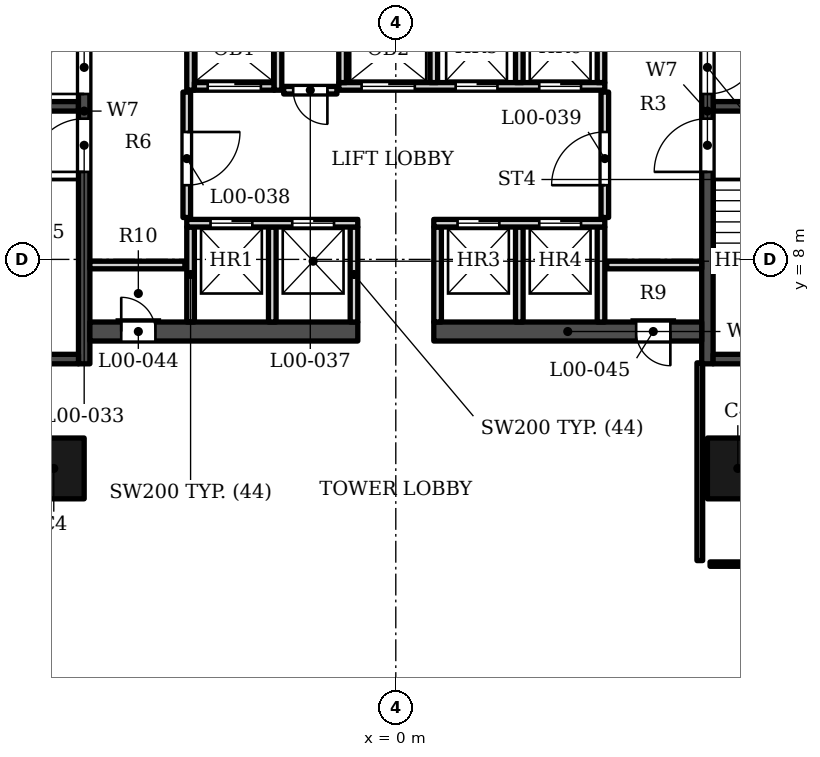
"""IFC4 building model, lengths in metres.
Left out: names, types, materials, properties, quantities, classifications, styles, units other than length and angle.
Written with IfcOpenShell. Run it as: python <this file> out.ifc"""

import sys

from ifc_helpers import new_model, si_unit, direction, frame, frame_2d, origin, origin_2d, place, context, subcontext, project, spatial, rectangle, extrude, element, fill, save


model = new_model("IFC4")
c1 = context("Model", 3, precision=1e-05, world=origin(), true_north=direction((0.0, 1.0)))
c2 = subcontext(c1, "Body", "Model", "MODEL_VIEW")
j1 = project(units=[si_unit("LENGTHUNIT", "METRE"), si_unit("PLANEANGLEUNIT", "RADIAN")], contexts=[c1])
p1 = place(None, origin())
s1 = spatial("IfcSite", under=j1, at=p1, CompositionType="ELEMENT")
p2 = place(p1, origin())
s2 = spatial("IfcBuilding", under=s1, at=p2, CompositionType="ELEMENT")
p3 = place(p2, origin())
s3 = spatial("IfcBuildingStorey", under=s2, at=p3, CompositionType="ELEMENT", Elevation=0.0)
for number, where, z_axis, x_axis in (
    (1, (-9.0, 2.5, 0.0), (0.0, 0.0, 1.0), (1.0, 0.0, 0.0)),
    (2, (9.0, 2.5, 0.0), (0.0, 0.0, 1.0), (1.0, 0.0, 0.0)),
):
    element("IfcColumn", number, at=place(p3, frame(where, z_axis=z_axis, x_axis=x_axis)), inside=s3, PredefinedType="COLUMN", context=c2, shape_type="SweptSolid", body=[
        extrude(rectangle(XDim=1.6, YDim=1.6, at=origin_2d()), origin(), (0.0, 0.0, 1.0), 9.0),
    ])
p4 = place(p3, frame((-8.2, 5.253, 0.0), z_axis=(0.0, 0.0, 1.0), x_axis=(0.0, 1.0, 0.0)))
e3 = element("IfcWall", 3, at=p4, inside=s3, PredefinedType="SHEAR", context=c2, shape_type="SweptSolid", body=[
    extrude(rectangle(XDim=13.3, YDim=0.3, at=frame_2d((6.65, 0.0))), origin(), (0.0, 0.0, 1.0), 9.0),
])
p5 = place(p4, frame((7.1, 0.0, 0.0)))
e4 = element("IfcOpeningElement", 4, at=p5, cuts=e3, PredefinedType="OPENING", context=c2, shape_type="SweptSolid", body=[
    extrude(rectangle(XDim=1.4, YDim=2.1, at=frame_2d((0.7, 1.05))), frame((0.0, 0.16, 0.0), z_axis=(0.0, -1.0, 0.0), x_axis=(1.0, 0.0, 0.0)), (0.0, 0.0, 1.0), 0.32),
])
p6 = place(p4, frame((5.05, 0.0, 0.0)))
e5 = element("IfcOpeningElement", 5, at=p6, cuts=e3, PredefinedType="OPENING", context=c2, shape_type="SweptSolid", body=[
    extrude(rectangle(XDim=1.4, YDim=2.1, at=frame_2d((0.7, 1.05))), frame((0.0, 0.16, 0.0), z_axis=(0.0, -1.0, 0.0), x_axis=(1.0, 0.0, 0.0)), (0.0, 0.0, 1.0), 0.32),
])
for number, where, z_axis, x_axis in (
    (6, (-12.1, 12.028, 0.0), (0.0, 0.0, 1.0), (1.0, 0.0, 0.0)),
    (7, (-12.1, 5.378, 0.0), (0.0, 0.0, 1.0), (1.0, 0.0, 0.0)),
):
    element("IfcWall", number, at=place(p3, frame(where, z_axis=z_axis, x_axis=x_axis)), inside=s3, PredefinedType="SHEAR", context=c2, shape_type="SweptSolid", body=[
        extrude(rectangle(XDim=3.75, YDim=0.25, at=frame_2d((1.875, 0.0))), origin(), (0.0, 0.0, 1.0), 9.0),
    ])
p7 = place(p3, frame((8.2, 5.253, 0.0), z_axis=(0.0, 0.0, 1.0), x_axis=(0.0, 1.0, 0.0)))
e8 = element("IfcWall", 8, at=p7, inside=s3, PredefinedType="SHEAR", context=c2, shape_type="SweptSolid", body=[
    extrude(rectangle(XDim=13.3, YDim=0.3, at=frame_2d((6.65, 0.0))), origin(), (0.0, 0.0, 1.0), 9.0),
])
p8 = place(p7, frame((7.1, 0.0, 0.0)))
e9 = element("IfcOpeningElement", 9, at=p8, cuts=e8, PredefinedType="OPENING", context=c2, shape_type="SweptSolid", body=[
    extrude(rectangle(XDim=1.4, YDim=2.1, at=frame_2d((0.7, 1.05))), frame((0.0, 0.16, 0.0), z_axis=(0.0, -1.0, 0.0), x_axis=(1.0, 0.0, 0.0)), (0.0, 0.0, 1.0), 0.32),
])
p9 = place(p7, frame((5.05, 0.0, 0.0)))
e10 = element("IfcOpeningElement", 10, at=p9, cuts=e8, PredefinedType="OPENING", context=c2, shape_type="SweptSolid", body=[
    extrude(rectangle(XDim=1.4, YDim=2.1, at=frame_2d((0.7, 1.05))), frame((0.0, 0.16, 0.0), z_axis=(0.0, -1.0, 0.0), x_axis=(1.0, 0.0, 0.0)), (0.0, 0.0, 1.0), 0.32),
])
for number, where, z_axis, x_axis in (
    (11, (8.35, 12.028, 0.0), (0.0, 0.0, 1.0), (1.0, 0.0, 0.0)),
    (12, (8.35, 5.378, 0.0), (0.0, 0.0, 1.0), (1.0, 0.0, 0.0)),
):
    element("IfcWall", number, at=place(p3, frame(where, z_axis=z_axis, x_axis=x_axis)), inside=s3, PredefinedType="SHEAR", context=c2, shape_type="SweptSolid", body=[
        extrude(rectangle(XDim=3.75, YDim=0.25, at=frame_2d((1.875, 0.0))), origin(), (0.0, 0.0, 1.0), 9.0),
    ])
p10 = place(p3, frame((-8.05, 6.103, 0.0), z_axis=(0.0, 0.0, 1.0), x_axis=(1.0, 0.0, 0.0)))
e13 = element("IfcWall", 13, at=p10, inside=s3, PredefinedType="SHEAR", context=c2, shape_type="SweptSolid", body=[
    extrude(rectangle(XDim=7.05, YDim=0.5, at=frame_2d((3.525, 0.0))), origin(), (0.0, 0.0, 1.0), 9.0),
])
p11 = place(p10, frame((0.825, 0.0, 0.0)))
e14 = element("IfcOpeningElement", 14, at=p11, cuts=e13, PredefinedType="OPENING", context=c2, shape_type="SweptSolid", body=[
    extrude(rectangle(XDim=0.9, YDim=2.1, at=frame_2d((0.45, 1.05))), frame((0.0, 0.26, 0.0), z_axis=(0.0, -1.0, 0.0), x_axis=(1.0, 0.0, 0.0)), (0.0, 0.0, 1.0), 0.52),
])
p12 = place(p3, frame((1.0, 6.103, 0.0), z_axis=(0.0, 0.0, 1.0), x_axis=(1.0, 0.0, 0.0)))
e15 = element("IfcWall", 15, at=p12, inside=s3, PredefinedType="SHEAR", context=c2, shape_type="SweptSolid", body=[
    extrude(rectangle(XDim=7.05, YDim=0.5, at=frame_2d((3.525, 0.0))), origin(), (0.0, 0.0, 1.0), 9.0),
])
p13 = place(p12, frame((5.325, 0.0, 0.0)))
e16 = element("IfcOpeningElement", 16, at=p13, cuts=e15, PredefinedType="OPENING", context=c2, shape_type="SweptSolid", body=[
    extrude(rectangle(XDim=0.9, YDim=2.1, at=frame_2d((0.45, 1.05))), frame((0.0, 0.26, 0.0), z_axis=(0.0, -1.0, 0.0), x_axis=(1.0, 0.0, 0.0)), (0.0, 0.0, 1.0), 0.52),
])
for number, where, z_axis, x_axis in (
    (17, (-5.4, 6.353, 0.0), (0.0, 0.0, 1.0), (0.0, 1.0, 0.0)),
    (18, (-3.25, 6.353, 0.0), (0.0, 0.0, 1.0), (0.0, 1.0, 0.0)),
    (19, (-1.1, 6.353, 0.0), (0.0, 0.0, 1.0), (0.0, 1.0, 0.0)),
    (20, (1.1, 6.353, 0.0), (0.0, 0.0, 1.0), (0.0, 1.0, 0.0)),
    (21, (3.25, 6.353, 0.0), (0.0, 0.0, 1.0), (0.0, 1.0, 0.0)),
    (22, (5.4, 6.353, 0.0), (0.0, 0.0, 1.0), (0.0, 1.0, 0.0)),
    (23, (-8.05, 7.853, 0.0), (0.0, 0.0, 1.0), (1.0, 0.0, 0.0)),
    (24, (5.55, 7.853, 0.0), (0.0, 0.0, 1.0), (1.0, 0.0, 0.0)),
):
    element("IfcWall", number, at=place(p3, frame(where, z_axis=z_axis, x_axis=x_axis)), inside=s3, PredefinedType="SOLIDWALL", context=c2, shape_type="SweptSolid", body=[
        extrude(rectangle(XDim=2.5, YDim=0.2, at=frame_2d((1.25, 0.0))), origin(), (0.0, 0.0, 1.0), 8.5),
    ])
p14 = place(p3, frame((-5.5, 8.953, 0.0), z_axis=(0.0, 0.0, 1.0), x_axis=(1.0, 0.0, 0.0)))
e25 = element("IfcWall", 25, at=p14, inside=s3, PredefinedType="SOLIDWALL", context=c2, shape_type="SweptSolid", body=[
    extrude(rectangle(XDim=4.5, YDim=0.2, at=frame_2d((2.25, 0.0))), origin(), (0.0, 0.0, 1.0), 8.5),
])
p15 = place(p14, frame((0.625, 0.0, 0.0)))
e26 = element("IfcOpeningElement", 26, at=p15, cuts=e25, PredefinedType="OPENING", context=c2, shape_type="SweptSolid", body=[
    extrude(rectangle(XDim=1.1, YDim=2.1, at=frame_2d((0.55, 1.05))), frame((0.0, 0.11, 0.0), z_axis=(0.0, -1.0, 0.0), x_axis=(1.0, 0.0, 0.0)), (0.0, 0.0, 1.0), 0.22),
])
p16 = place(p14, frame((2.775, 0.0, 0.0)))
e27 = element("IfcOpeningElement", 27, at=p16, cuts=e25, PredefinedType="OPENING", context=c2, shape_type="SweptSolid", body=[
    extrude(rectangle(XDim=1.1, YDim=2.1, at=frame_2d((0.55, 1.05))), frame((0.0, 0.11, 0.0), z_axis=(0.0, -1.0, 0.0), x_axis=(1.0, 0.0, 0.0)), (0.0, 0.0, 1.0), 0.22),
])
p17 = place(p3, frame((1.0, 8.953, 0.0), z_axis=(0.0, 0.0, 1.0), x_axis=(1.0, 0.0, 0.0)))
e28 = element("IfcWall", 28, at=p17, inside=s3, PredefinedType="SOLIDWALL", context=c2, shape_type="SweptSolid", body=[
    extrude(rectangle(XDim=4.5, YDim=0.2, at=frame_2d((2.25, 0.0))), origin(), (0.0, 0.0, 1.0), 8.5),
])
p18 = place(p17, frame((0.625, 0.0, 0.0)))
e29 = element("IfcOpeningElement", 29, at=p18, cuts=e28, PredefinedType="OPENING", context=c2, shape_type="SweptSolid", body=[
    extrude(rectangle(XDim=1.1, YDim=2.1, at=frame_2d((0.55, 1.05))), frame((0.0, 0.11, 0.0), z_axis=(0.0, -1.0, 0.0), x_axis=(1.0, 0.0, 0.0)), (0.0, 0.0, 1.0), 0.22),
])
p19 = place(p17, frame((2.775, 0.0, 0.0)))
e30 = element("IfcOpeningElement", 30, at=p19, cuts=e28, PredefinedType="OPENING", context=c2, shape_type="SweptSolid", body=[
    extrude(rectangle(XDim=1.1, YDim=2.1, at=frame_2d((0.55, 1.05))), frame((0.0, 0.11, 0.0), z_axis=(0.0, -1.0, 0.0), x_axis=(1.0, 0.0, 0.0)), (0.0, 0.0, 1.0), 0.22),
])
p20 = place(p3, frame((-5.5, 9.103, 0.0), z_axis=(0.0, 0.0, 1.0), x_axis=(0.0, 1.0, 0.0)))
e31 = element("IfcWall", 31, at=p20, inside=s3, PredefinedType="SOLIDWALL", context=c2, shape_type="SweptSolid", body=[
    extrude(rectangle(XDim=3.3, YDim=0.2, at=frame_2d((1.65, 0.0))), origin(), (0.0, 0.0, 1.0), 8.5),
])
p21 = place(p20, frame((0.85, 0.0, 0.0)))
e32 = element("IfcOpeningElement", 32, at=p21, cuts=e31, PredefinedType="OPENING", context=c2, shape_type="SweptSolid", body=[
    extrude(rectangle(XDim=1.4, YDim=2.1, at=frame_2d((0.7, 1.05))), frame((0.0, 0.11, 0.0), z_axis=(0.0, -1.0, 0.0), x_axis=(1.0, 0.0, 0.0)), (0.0, 0.0, 1.0), 0.22),
])
p22 = place(p3, frame((5.5, 9.103, 0.0), z_axis=(0.0, 0.0, 1.0), x_axis=(0.0, 1.0, 0.0)))
e33 = element("IfcWall", 33, at=p22, inside=s3, PredefinedType="SOLIDWALL", context=c2, shape_type="SweptSolid", body=[
    extrude(rectangle(XDim=3.3, YDim=0.2, at=frame_2d((1.65, 0.0))), origin(), (0.0, 0.0, 1.0), 8.5),
])
p23 = place(p22, frame((0.85, 0.0, 0.0)))
e34 = element("IfcOpeningElement", 34, at=p23, cuts=e33, PredefinedType="OPENING", context=c2, shape_type="SweptSolid", body=[
    extrude(rectangle(XDim=1.4, YDim=2.1, at=frame_2d((0.7, 1.05))), frame((0.0, 0.11, 0.0), z_axis=(0.0, -1.0, 0.0), x_axis=(1.0, 0.0, 0.0)), (0.0, 0.0, 1.0), 0.22),
])
p24 = place(p3, frame((-2.95, 12.453, 0.0), z_axis=(0.0, 0.0, 1.0), x_axis=(1.0, 0.0, 0.0)))
e35 = element("IfcWall", 35, at=p24, inside=s3, PredefinedType="SOLIDWALL", context=c2, shape_type="SweptSolid", body=[
    extrude(rectangle(XDim=1.4, YDim=0.2, at=frame_2d((0.7, 0.0))), origin(), (0.0, 0.0, 1.0), 8.5),
])
p25 = place(p24, frame((0.25, 0.0, 0.0)))
e36 = element("IfcOpeningElement", 36, at=p25, cuts=e35, PredefinedType="OPENING", context=c2, shape_type="SweptSolid", body=[
    extrude(rectangle(XDim=0.9, YDim=2.1, at=frame_2d((0.45, 1.05))), frame((0.0, 0.11, 0.0), z_axis=(0.0, -1.0, 0.0), x_axis=(1.0, 0.0, 0.0)), (0.0, 0.0, 1.0), 0.22),
])
p26 = place(p3, frame((-5.4, 12.453, 0.0), z_axis=(0.0, 0.0, 1.0), x_axis=(0.0, 1.0, 0.0)))
e37 = element("IfcWall", 37, at=p26, inside=s3, PredefinedType="SOLIDWALL", context=c2, shape_type="SweptSolid", body=[
    extrude(rectangle(XDim=3.0, YDim=0.2, at=frame_2d((1.5, 0.0))), origin(), (0.0, 0.0, 1.0), 8.5),
])
p27 = place(p3, frame((-5.3, 12.552, 0.0), z_axis=(0.0, 0.0, 1.0), x_axis=(1.0, 0.0, 0.0)))
e38 = element("IfcWall", 38, at=p27, inside=s3, PredefinedType="SOLIDWALL", context=c2, shape_type="SweptSolid", body=[
    extrude(rectangle(XDim=2.1, YDim=0.2, at=frame_2d((1.05, 0.0))), origin(), (0.0, 0.0, 1.0), 8.5),
])
p28 = place(p27, frame((0.35, 0.0, 0.0)))
e39 = element("IfcOpeningElement", 39, at=p28, cuts=e38, PredefinedType="OPENING", context=c2, shape_type="SweptSolid", body=[
    extrude(rectangle(XDim=1.4, YDim=2.4, at=frame_2d((0.7, 1.2))), frame((0.0, 0.11, 0.0), z_axis=(0.0, -1.0, 0.0), x_axis=(1.0, 0.0, 0.0)), (0.0, 0.0, 1.0), 0.22),
])
p29 = place(p3, frame((-3.1, 12.453, 0.0), z_axis=(0.0, 0.0, 1.0), x_axis=(0.0, 1.0, 0.0)))
e40 = element("IfcWall", 40, at=p29, inside=s3, PredefinedType="SOLIDWALL", context=c2, shape_type="SweptSolid", body=[
    extrude(rectangle(XDim=3.0, YDim=0.2, at=frame_2d((1.5, 0.0))), origin(), (0.0, 0.0, 1.0), 8.5),
])
p30 = place(p3, frame((-1.5, 12.552, 0.0), z_axis=(0.0, 0.0, 1.0), x_axis=(1.0, 0.0, 0.0)))
e41 = element("IfcWall", 41, at=p30, inside=s3, PredefinedType="SOLIDWALL", context=c2, shape_type="SweptSolid", body=[
    extrude(rectangle(XDim=7.0, YDim=0.2, at=frame_2d((3.5, 0.0))), origin(), (0.0, 0.0, 1.0), 8.5),
])
p31 = place(p30, frame((0.6, 0.0, 0.0)))
e42 = element("IfcOpeningElement", 42, at=p31, cuts=e41, PredefinedType="OPENING", context=c2, shape_type="SweptSolid", body=[
    extrude(rectangle(XDim=1.4, YDim=2.4, at=frame_2d((0.7, 1.2))), frame((0.0, 0.11, 0.0), z_axis=(0.0, -1.0, 0.0), x_axis=(1.0, 0.0, 0.0)), (0.0, 0.0, 1.0), 0.22),
])
p32 = place(p30, frame((3.075, 0.0, 0.0)))
e43 = element("IfcOpeningElement", 43, at=p32, cuts=e41, PredefinedType="OPENING", context=c2, shape_type="SweptSolid", body=[
    extrude(rectangle(XDim=1.1, YDim=2.1, at=frame_2d((0.55, 1.05))), frame((0.0, 0.11, 0.0), z_axis=(0.0, -1.0, 0.0), x_axis=(1.0, 0.0, 0.0)), (0.0, 0.0, 1.0), 0.22),
])
p33 = place(p30, frame((5.275, 0.0, 0.0)))
e44 = element("IfcOpeningElement", 44, at=p33, cuts=e41, PredefinedType="OPENING", context=c2, shape_type="SweptSolid", body=[
    extrude(rectangle(XDim=1.1, YDim=2.1, at=frame_2d((0.55, 1.05))), frame((0.0, 0.11, 0.0), z_axis=(0.0, -1.0, 0.0), x_axis=(1.0, 0.0, 0.0)), (0.0, 0.0, 1.0), 0.22),
])
for number, where, z_axis, x_axis in (
    (45, (-1.4, 12.653, 0.0), (0.0, 0.0, 1.0), (0.0, 1.0, 0.0)),
    (46, (1.0, 12.653, 0.0), (0.0, 0.0, 1.0), (0.0, 1.0, 0.0)),
    (47, (3.25, 12.653, 0.0), (0.0, 0.0, 1.0), (0.0, 1.0, 0.0)),
):
    element("IfcWall", number, at=place(p3, frame(where, z_axis=z_axis, x_axis=x_axis)), inside=s3, PredefinedType="SOLIDWALL", context=c2, shape_type="SweptSolid", body=[
        extrude(rectangle(XDim=2.6, YDim=0.2, at=frame_2d((1.3, 0.0))), origin(), (0.0, 0.0, 1.0), 8.5),
    ])
p34 = place(p3, frame((5.4, 12.653, 0.0), z_axis=(0.0, 0.0, 1.0), x_axis=(0.0, 1.0, 0.0)))
e48 = element("IfcWall", 48, at=p34, inside=s3, PredefinedType="SOLIDWALL", context=c2, shape_type="SweptSolid", body=[
    extrude(rectangle(XDim=1.6, YDim=0.2, at=frame_2d((0.8, 0.0))), origin(), (0.0, 0.0, 1.0), 8.5),
])
p35 = place(p3, frame((8.27, -0.018, 0.0), z_axis=(0.0, 0.0, 1.0), x_axis=(1.0, 0.0, 0.0)))
e49 = element("IfcWall", 49, at=p35, inside=s3, PredefinedType="PARTITIONING", context=c2, shape_type="SweptSolid", body=[
    extrude(rectangle(XDim=17.805, YDim=0.115, at=frame_2d((8.902, 0.0))), origin(), (0.0, 0.0, 1.0), 7.3),
])
p36 = place(p35, frame((3.33, 0.0, 0.0)))
e50 = element("IfcOpeningElement", 50, at=p36, cuts=e49, PredefinedType="OPENING", context=c2, shape_type="SweptSolid", body=[
    extrude(rectangle(XDim=1.1, YDim=2.1, at=frame_2d((0.55, 1.05))), frame((0.0, 0.067, 0.0), z_axis=(0.0, -1.0, 0.0), x_axis=(1.0, 0.0, 0.0)), (0.0, 0.0, 1.0), 0.135),
])
p37 = place(p35, frame((12.58, 0.0, 0.0)))
e51 = element("IfcOpeningElement", 51, at=p37, cuts=e49, PredefinedType="OPENING", context=c2, shape_type="SweptSolid", body=[
    extrude(rectangle(XDim=1.0, YDim=2.1, at=frame_2d((0.5, 1.05))), frame((0.0, 0.067, 0.0), z_axis=(0.0, -1.0, 0.0), x_axis=(1.0, 0.0, 0.0)), (0.0, 0.0, 1.0), 0.135),
])
p38 = place(p3, frame((8.0, 0.075, 0.0), z_axis=(0.0, 0.0, 1.0), x_axis=(0.0, 1.0, 0.0)))
e52 = element("IfcWall", 52, at=p38, inside=s3, PredefinedType="PARTITIONING", context=c2, shape_type="SweptSolid", body=[
    extrude(rectangle(XDim=5.203, YDim=0.15, at=frame_2d((2.602, 0.0))), origin(), (0.0, 0.0, 1.0), 8.5),
])
p39 = place(p15, origin())
e53 = element("IfcDoor", 53, at=p39, inside=s3, OperationType="DOUBLE_DOOR_SLIDING", PredefinedType="DOOR", context=c2, shape_type="SweptSolid", body=[
    extrude(rectangle(XDim=1.1, YDim=2.1, at=frame_2d((0.55, 1.05))), frame((0.0, 0.025, 0.0), z_axis=(0.0, -1.0, 0.0), x_axis=(1.0, 0.0, 0.0)), (0.0, 0.0, 1.0), 0.05),
])
fill(e26, e53)
p40 = place(p16, origin())
e54 = element("IfcDoor", 54, at=p40, inside=s3, OperationType="DOUBLE_DOOR_SLIDING", PredefinedType="DOOR", context=c2, shape_type="SweptSolid", body=[
    extrude(rectangle(XDim=1.1, YDim=2.1, at=frame_2d((0.55, 1.05))), frame((0.0, 0.025, 0.0), z_axis=(0.0, -1.0, 0.0), x_axis=(1.0, 0.0, 0.0)), (0.0, 0.0, 1.0), 0.05),
])
fill(e27, e54)
p41 = place(p18, origin())
e55 = element("IfcDoor", 55, at=p41, inside=s3, OperationType="DOUBLE_DOOR_SLIDING", PredefinedType="DOOR", context=c2, shape_type="SweptSolid", body=[
    extrude(rectangle(XDim=1.1, YDim=2.1, at=frame_2d((0.55, 1.05))), frame((0.0, 0.025, 0.0), z_axis=(0.0, -1.0, 0.0), x_axis=(1.0, 0.0, 0.0)), (0.0, 0.0, 1.0), 0.05),
])
fill(e29, e55)
p42 = place(p19, origin())
e56 = element("IfcDoor", 56, at=p42, inside=s3, OperationType="DOUBLE_DOOR_SLIDING", PredefinedType="DOOR", context=c2, shape_type="SweptSolid", body=[
    extrude(rectangle(XDim=1.1, YDim=2.1, at=frame_2d((0.55, 1.05))), frame((0.0, 0.025, 0.0), z_axis=(0.0, -1.0, 0.0), x_axis=(1.0, 0.0, 0.0)), (0.0, 0.0, 1.0), 0.05),
])
fill(e30, e56)
p43 = place(p28, origin())
e57 = element("IfcDoor", 57, at=p43, inside=s3, OperationType="DOUBLE_DOOR_SLIDING", PredefinedType="DOOR", context=c2, shape_type="SweptSolid", body=[
    extrude(rectangle(XDim=1.4, YDim=2.4, at=frame_2d((0.7, 1.2))), frame((0.0, 0.025, 0.0), z_axis=(0.0, -1.0, 0.0), x_axis=(1.0, 0.0, 0.0)), (0.0, 0.0, 1.0), 0.05),
])
fill(e39, e57)
p44 = place(p31, origin())
e58 = element("IfcDoor", 58, at=p44, inside=s3, OperationType="DOUBLE_DOOR_SLIDING", PredefinedType="DOOR", context=c2, shape_type="SweptSolid", body=[
    extrude(rectangle(XDim=1.4, YDim=2.4, at=frame_2d((0.7, 1.2))), frame((0.0, 0.025, 0.0), z_axis=(0.0, -1.0, 0.0), x_axis=(1.0, 0.0, 0.0)), (0.0, 0.0, 1.0), 0.05),
])
fill(e42, e58)
p45 = place(p32, origin())
e59 = element("IfcDoor", 59, at=p45, inside=s3, OperationType="DOUBLE_DOOR_SLIDING", PredefinedType="DOOR", context=c2, shape_type="SweptSolid", body=[
    extrude(rectangle(XDim=1.1, YDim=2.1, at=frame_2d((0.55, 1.05))), frame((0.0, 0.025, 0.0), z_axis=(0.0, -1.0, 0.0), x_axis=(1.0, 0.0, 0.0)), (0.0, 0.0, 1.0), 0.05),
])
fill(e43, e59)
p46 = place(p33, origin())
e60 = element("IfcDoor", 60, at=p46, inside=s3, OperationType="DOUBLE_DOOR_SLIDING", PredefinedType="DOOR", context=c2, shape_type="SweptSolid", body=[
    extrude(rectangle(XDim=1.1, YDim=2.1, at=frame_2d((0.55, 1.05))), frame((0.0, 0.025, 0.0), z_axis=(0.0, -1.0, 0.0), x_axis=(1.0, 0.0, 0.0)), (0.0, 0.0, 1.0), 0.05),
])
fill(e44, e60)
p47 = place(p5, origin())
e61 = element("IfcDoor", 61, at=p47, inside=s3, OperationType="SINGLE_SWING_LEFT", PredefinedType="DOOR", context=c2, shape_type="SweptSolid", body=[
    extrude(rectangle(XDim=1.4, YDim=2.1, at=frame_2d((0.7, 1.05))), frame((0.0, 0.025, 0.0), z_axis=(0.0, -1.0, 0.0), x_axis=(1.0, 0.0, 0.0)), (0.0, 0.0, 1.0), 0.05),
])
fill(e4, e61)
p48 = place(p6, origin())
e62 = element("IfcDoor", 62, at=p48, inside=s3, OperationType="SINGLE_SWING_LEFT", PredefinedType="DOOR", context=c2, shape_type="SweptSolid", body=[
    extrude(rectangle(XDim=1.4, YDim=2.1, at=frame_2d((0.7, 1.05))), frame((0.0, 0.025, 0.0), z_axis=(0.0, -1.0, 0.0), x_axis=(1.0, 0.0, 0.0)), (0.0, 0.0, 1.0), 0.05),
])
fill(e5, e62)
p49 = place(p8, origin())
e63 = element("IfcDoor", 63, at=p49, inside=s3, OperationType="SINGLE_SWING_RIGHT", PredefinedType="DOOR", context=c2, shape_type="SweptSolid", body=[
    extrude(rectangle(XDim=1.4, YDim=2.1, at=frame_2d((0.7, 1.05))), frame((0.0, 0.025, 0.0), z_axis=(0.0, -1.0, 0.0), x_axis=(1.0, 0.0, 0.0)), (0.0, 0.0, 1.0), 0.05),
])
fill(e9, e63)
p50 = place(p9, origin())
e64 = element("IfcDoor", 64, at=p50, inside=s3, OperationType="SINGLE_SWING_LEFT", PredefinedType="DOOR", context=c2, shape_type="SweptSolid", body=[
    extrude(rectangle(XDim=1.4, YDim=2.1, at=frame_2d((0.7, 1.05))), frame((0.0, 0.025, 0.0), z_axis=(0.0, -1.0, 0.0), x_axis=(1.0, 0.0, 0.0)), (0.0, 0.0, 1.0), 0.05),
])
fill(e10, e64)
p51 = place(p25, origin())
e65 = element("IfcDoor", 65, at=p51, inside=s3, OperationType="SINGLE_SWING_RIGHT", PredefinedType="DOOR", context=c2, shape_type="SweptSolid", body=[
    extrude(rectangle(XDim=0.9, YDim=2.1, at=frame_2d((0.45, 1.05))), frame((0.0, 0.025, 0.0), z_axis=(0.0, -1.0, 0.0), x_axis=(1.0, 0.0, 0.0)), (0.0, 0.0, 1.0), 0.05),
])
fill(e36, e65)
p52 = place(p21, origin())
e66 = element("IfcDoor", 66, at=p52, inside=s3, OperationType="SINGLE_SWING_RIGHT", PredefinedType="DOOR", context=c2, shape_type="SweptSolid", body=[
    extrude(rectangle(XDim=1.4, YDim=2.1, at=frame_2d((0.7, 1.05))), frame((0.0, 0.025, 0.0), z_axis=(0.0, -1.0, 0.0), x_axis=(1.0, 0.0, 0.0)), (0.0, 0.0, 1.0), 0.05),
])
fill(e32, e66)
p53 = place(p23, origin())
e67 = element("IfcDoor", 67, at=p53, inside=s3, OperationType="SINGLE_SWING_LEFT", PredefinedType="DOOR", context=c2, shape_type="SweptSolid", body=[
    extrude(rectangle(XDim=1.4, YDim=2.1, at=frame_2d((0.7, 1.05))), frame((0.0, 0.025, 0.0), z_axis=(0.0, -1.0, 0.0), x_axis=(1.0, 0.0, 0.0)), (0.0, 0.0, 1.0), 0.05),
])
fill(e34, e67)
p54 = place(p11, origin())
e68 = element("IfcDoor", 68, at=p54, inside=s3, OperationType="SINGLE_SWING_LEFT", PredefinedType="DOOR", context=c2, shape_type="SweptSolid", body=[
    extrude(rectangle(XDim=0.9, YDim=2.1, at=frame_2d((0.45, 1.05))), frame((0.0, 0.025, 0.0), z_axis=(0.0, -1.0, 0.0), x_axis=(1.0, 0.0, 0.0)), (0.0, 0.0, 1.0), 0.05),
])
fill(e14, e68)
p55 = place(p13, origin())
e69 = element("IfcDoor", 69, at=p55, inside=s3, OperationType="SINGLE_SWING_RIGHT", PredefinedType="DOOR", context=c2, shape_type="SweptSolid", body=[
    extrude(rectangle(XDim=0.9, YDim=2.1, at=frame_2d((0.45, 1.05))), frame((0.0, 0.025, 0.0), z_axis=(0.0, -1.0, 0.0), x_axis=(1.0, 0.0, 0.0)), (0.0, 0.0, 1.0), 0.05),
])
fill(e16, e69)
save(model, sys.argv[1])
